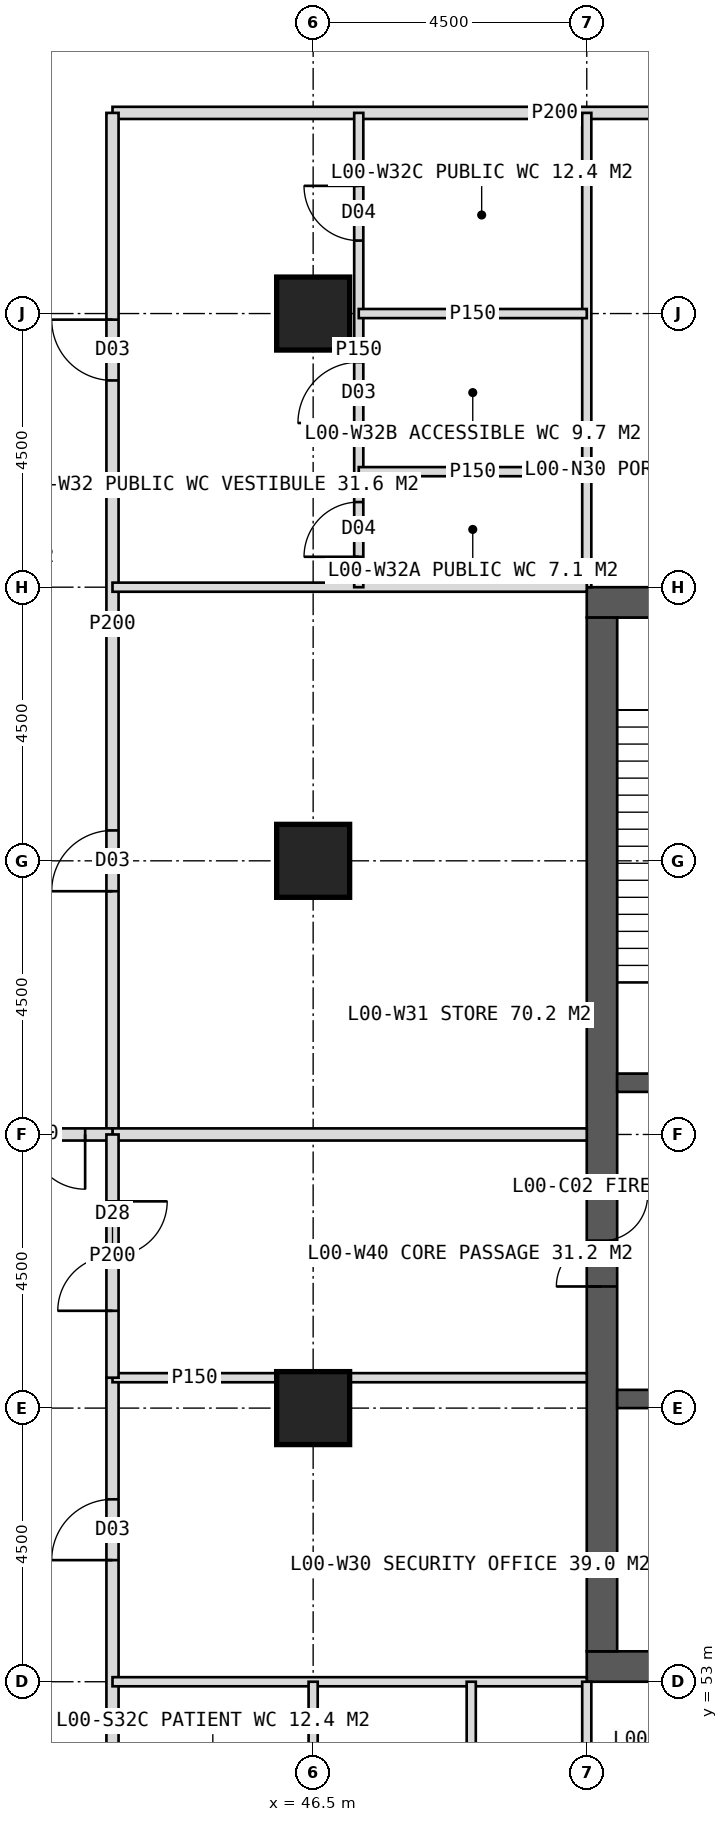
"""IFC4 building model, lengths in metres.
Left out: names, types, materials, properties, quantities, classifications, styles, units other than length and angle.
Written with IfcOpenShell. Run it as: python <this file> out.ifc"""

import sys

from ifc_helpers import new_model, si_unit, direction, frame, frame_2d, origin, origin_2d, place, context, subcontext, project, spatial, rectangle, hollow_rectangle, extrude, element, fill, save


model = new_model("IFC4")
c1 = context("Model", 3, precision=1e-05, world=origin(), true_north=direction((0.0, 1.0)))
c2 = subcontext(c1, "Body", "Model", "MODEL_VIEW")
j1 = project(units=[si_unit("LENGTHUNIT", "METRE"), si_unit("PLANEANGLEUNIT", "RADIAN")], contexts=[c1])
p1 = place(None, origin())
s1 = spatial("IfcSite", under=j1, at=p1, CompositionType="ELEMENT")
p2 = place(p1, origin())
s2 = spatial("IfcBuilding", under=s1, at=p2, CompositionType="ELEMENT")
p3 = place(p2, origin())
s3 = spatial("IfcBuildingStorey", under=s2, at=p3, CompositionType="ELEMENT", Elevation=0.0)
p4 = place(p3, frame((51.0, 70.75, 0.0), z_axis=(0.0, 0.0, 1.0), x_axis=(1.0, 0.0, 0.0)))
e1 = element("IfcWall", 1, at=p4, inside=s3, PredefinedType="SHEAR", context=c2, shape_type="SweptSolid", body=[
    extrude(rectangle(XDim=18.0, YDim=0.5, at=frame_2d((9.0, 0.0))), origin(), (0.0, 0.0, 1.0), 6.0),
])
p5 = place(p4, frame((8.1, 0.0, 0.0)))
e2 = element("IfcOpeningElement", 2, at=p5, cuts=e1, PredefinedType="OPENING", context=c2, shape_type="SweptSolid", body=[
    extrude(rectangle(XDim=1.8, YDim=2.2, at=frame_2d((0.9, 1.1))), frame((0.0, 0.26, 0.0), z_axis=(0.0, -1.0, 0.0), x_axis=(1.0, 0.0, 0.0)), (0.0, 0.0, 1.0), 0.52),
])
p6 = place(p3, frame((51.0, 53.25, 0.0), z_axis=(0.0, 0.0, 1.0), x_axis=(1.0, 0.0, 0.0)))
e3 = element("IfcWall", 3, at=p6, inside=s3, PredefinedType="SHEAR", context=c2, shape_type="SweptSolid", body=[
    extrude(rectangle(XDim=18.0, YDim=0.5, at=frame_2d((9.0, 0.0))), origin(), (0.0, 0.0, 1.0), 6.0),
])
p7 = place(p6, frame((8.1, 0.0, 0.0)))
e4 = element("IfcOpeningElement", 4, at=p7, cuts=e3, PredefinedType="OPENING", context=c2, shape_type="SweptSolid", body=[
    extrude(rectangle(XDim=1.8, YDim=2.2, at=frame_2d((0.9, 1.1))), frame((0.0, 0.26, 0.0), z_axis=(0.0, -1.0, 0.0), x_axis=(1.0, 0.0, 0.0)), (0.0, 0.0, 1.0), 0.52),
])
p8 = place(p3, frame((51.25, 53.5, 0.0), z_axis=(0.0, 0.0, 1.0), x_axis=(0.0, 1.0, 0.0)))
e5 = element("IfcWall", 5, at=p8, inside=s3, PredefinedType="SHEAR", context=c2, shape_type="SweptSolid", body=[
    extrude(rectangle(XDim=17.0, YDim=0.5, at=frame_2d((8.5, 0.0))), origin(), (0.0, 0.0, 1.0), 6.0),
])
p9 = place(p8, frame((6.0, 0.0, 0.0)))
e6 = element("IfcOpeningElement", 6, at=p9, cuts=e5, PredefinedType="OPENING", context=c2, shape_type="SweptSolid", body=[
    extrude(rectangle(XDim=1.5, YDim=2.2, at=frame_2d((0.75, 1.1))), frame((0.0, 0.26, 0.0), z_axis=(0.0, -1.0, 0.0), x_axis=(1.0, 0.0, 0.0)), (0.0, 0.0, 1.0), 0.52),
])
p10 = place(p3, frame((51.5, 62.85, 0.0), z_axis=(0.0, 0.0, 1.0), x_axis=(1.0, 0.0, 0.0)))
e7 = element("IfcWall", 7, at=p10, inside=s3, PredefinedType="SHEAR", context=c2, shape_type="SweptSolid", body=[
    extrude(rectangle(XDim=3.3, YDim=0.3, at=frame_2d((1.65, 0.0))), origin(), (0.0, 0.0, 1.0), 6.0),
])
p11 = place(p10, frame((1.05, 0.0, 0.0)))
e8 = element("IfcOpeningElement", 8, at=p11, cuts=e7, PredefinedType="OPENING", context=c2, shape_type="SweptSolid", body=[
    extrude(rectangle(XDim=1.2, YDim=2.1, at=frame_2d((0.6, 1.05))), frame((0.0, 0.16, 0.0), z_axis=(0.0, -1.0, 0.0), x_axis=(1.0, 0.0, 0.0)), (0.0, 0.0, 1.0), 0.32),
])
p12 = place(p3, frame((51.5, 57.65, 0.0), z_axis=(0.0, 0.0, 1.0), x_axis=(1.0, 0.0, 0.0)))
e9 = element("IfcWall", 9, at=p12, inside=s3, PredefinedType="SHEAR", context=c2, shape_type="SweptSolid", body=[
    extrude(rectangle(XDim=3.3, YDim=0.3, at=frame_2d((1.65, 0.0))), origin(), (0.0, 0.0, 1.0), 6.0),
])
p13 = place(p12, frame((1.05, 0.0, 0.0)))
e10 = element("IfcOpeningElement", 10, at=p13, cuts=e9, PredefinedType="OPENING", context=c2, shape_type="SweptSolid", body=[
    extrude(rectangle(XDim=1.2, YDim=2.2, at=frame_2d((0.6, 1.1))), frame((0.0, 0.16, 0.0), z_axis=(0.0, -1.0, 0.0), x_axis=(1.0, 0.0, 0.0)), (0.0, 0.0, 1.0), 0.32),
])
for number, where, z_axis, x_axis in (
    (11, (46.5, 75.5, 0.0), (0.0, 0.0, 1.0), (1.0, 0.0, 0.0)),
    (12, (46.5, 57.5, 0.0), (0.0, 0.0, 1.0), (1.0, 0.0, 0.0)),
    (13, (46.5, 66.5, 0.0), (0.0, 0.0, 1.0), (1.0, 0.0, 0.0)),
):
    element("IfcColumn", number, at=place(p3, frame(where, z_axis=z_axis, x_axis=x_axis)), inside=s3, PredefinedType="COLUMN", context=c2, shape_type="SweptSolid", body=[
        extrude(hollow_rectangle(XDim=1.2, YDim=1.2, WallThickness=0.1, at=origin_2d()), origin(), (0.0, 0.0, 1.0), 6.0),
    ])
p14 = place(p3, frame((43.2, 78.8, 0.0), z_axis=(0.0, 0.0, 1.0), x_axis=(1.0, 0.0, 0.0)))
e14 = element("IfcWall", 14, at=p14, inside=s3, PredefinedType="PARTITIONING", context=c2, shape_type="SweptSolid", body=[
    extrude(rectangle(XDim=14.55, YDim=0.2, at=frame_2d((7.275, 0.0))), origin(), (0.0, 0.0, 1.0), 5.7),
])
p15 = place(p14, frame((10.675, 0.0, 0.0)))
e15 = element("IfcOpeningElement", 15, at=p15, cuts=e14, PredefinedType="OPENING", context=c2, shape_type="SweptSolid", body=[
    extrude(rectangle(XDim=1.0, YDim=2.1, at=frame_2d((0.5, 1.05))), frame((0.0, 0.11, 0.0), z_axis=(0.0, -1.0, 0.0), x_axis=(1.0, 0.0, 0.0)), (0.0, 0.0, 1.0), 0.22),
])
p16 = place(p3, frame((51.0, 71.0, 0.0), z_axis=(0.0, 0.0, 1.0), x_axis=(0.0, 1.0, 0.0)))
e16 = element("IfcWall", 16, at=p16, inside=s3, PredefinedType="PARTITIONING", context=c2, shape_type="SweptSolid", body=[
    extrude(rectangle(XDim=7.8, YDim=0.15, at=frame_2d((3.9, 0.0))), origin(), (0.0, 0.0, 1.0), 5.7),
])
p17 = place(p3, frame((43.2, 45.2, 0.0), z_axis=(0.0, 0.0, 1.0), x_axis=(0.0, 1.0, 0.0)))
e17 = element("IfcWall", 17, at=p17, inside=s3, PredefinedType="PARTITIONING", context=c2, shape_type="SweptSolid", body=[
    extrude(rectangle(XDim=12.8, YDim=0.2, at=frame_2d((6.4, 0.0))), origin(), (0.0, 0.0, 1.0), 5.7),
])
p18 = place(p17, frame((9.8, 0.0, 0.0)))
e18 = element("IfcOpeningElement", 18, at=p18, cuts=e17, PredefinedType="OPENING", context=c2, shape_type="SweptSolid", body=[
    extrude(rectangle(XDim=1.0, YDim=2.1, at=frame_2d((0.5, 1.05))), frame((0.0, 0.11, 0.0), z_axis=(0.0, -1.0, 0.0), x_axis=(1.0, 0.0, 0.0)), (0.0, 0.0, 1.0), 0.22),
])
p19 = place(p3, frame((43.2, 62.0, 0.0), z_axis=(0.0, 0.0, 1.0), x_axis=(0.0, 1.0, 0.0)))
e19 = element("IfcWall", 19, at=p19, inside=s3, PredefinedType="PARTITIONING", context=c2, shape_type="SweptSolid", body=[
    extrude(rectangle(XDim=16.8, YDim=0.2, at=frame_2d((8.4, 0.0))), origin(), (0.0, 0.0, 1.0), 5.7),
])
p20 = place(p19, frame((4.0, 0.0, 0.0)))
e20 = element("IfcOpeningElement", 20, at=p20, cuts=e19, PredefinedType="OPENING", context=c2, shape_type="SweptSolid", body=[
    extrude(rectangle(XDim=1.0, YDim=2.1, at=frame_2d((0.5, 1.05))), frame((0.0, 0.11, 0.0), z_axis=(0.0, -1.0, 0.0), x_axis=(1.0, 0.0, 0.0)), (0.0, 0.0, 1.0), 0.22),
])
p21 = place(p19, frame((12.4, 0.0, 0.0)))
e21 = element("IfcOpeningElement", 21, at=p21, cuts=e19, PredefinedType="OPENING", context=c2, shape_type="SweptSolid", body=[
    extrude(rectangle(XDim=1.0, YDim=2.1, at=frame_2d((0.5, 1.05))), frame((0.0, 0.11, 0.0), z_axis=(0.0, -1.0, 0.0), x_axis=(1.0, 0.0, 0.0)), (0.0, 0.0, 1.0), 0.22),
])
p22 = place(p3, frame((51.0, 53.0, 0.0), z_axis=(0.0, 0.0, 1.0), x_axis=(-1.0, 0.0, 0.0)))
e22 = element("IfcWall", 22, at=p22, inside=s3, PredefinedType="PARTITIONING", context=c2, shape_type="SweptSolid", body=[
    extrude(rectangle(XDim=7.8, YDim=0.15, at=frame_2d((3.9, 0.0))), origin(), (0.0, 0.0, 1.0), 5.7),
])
p23 = place(p3, frame((51.0, 58.0, 0.0), z_axis=(0.0, 0.0, 1.0), x_axis=(-1.0, 0.0, 0.0)))
e23 = element("IfcWall", 23, at=p23, inside=s3, PredefinedType="PARTITIONING", context=c2, shape_type="SweptSolid", body=[
    extrude(rectangle(XDim=3.9, YDim=0.15, at=frame_2d((1.95, 0.0))), origin(), (0.0, 0.0, 1.0), 5.7),
])
p24 = place(p3, frame((45.9, 58.0, 0.0), z_axis=(0.0, 0.0, 1.0), x_axis=(-1.0, 0.0, 0.0)))
e24 = element("IfcWall", 24, at=p24, inside=s3, PredefinedType="PARTITIONING", context=c2, shape_type="SweptSolid", body=[
    extrude(rectangle(XDim=2.7, YDim=0.15, at=frame_2d((1.35, 0.0))), origin(), (0.0, 0.0, 1.0), 5.7),
])
p25 = place(p3, frame((51.0, 62.0, 0.0), z_axis=(0.0, 0.0, 1.0), x_axis=(-1.0, 0.0, 0.0)))
e25 = element("IfcWall", 25, at=p25, inside=s3, PredefinedType="SOLIDWALL", context=c2, shape_type="SweptSolid", body=[
    extrude(rectangle(XDim=7.8, YDim=0.2, at=frame_2d((3.9, 0.0))), origin(), (0.0, 0.0, 1.0), 4.9),
])
p26 = place(p3, frame((51.0, 71.0, 0.0), z_axis=(0.0, 0.0, 1.0), x_axis=(-1.0, 0.0, 0.0)))
e26 = element("IfcWall", 26, at=p26, inside=s3, PredefinedType="PARTITIONING", context=c2, shape_type="SweptSolid", body=[
    extrude(rectangle(XDim=7.8, YDim=0.15, at=frame_2d((3.9, 0.0))), origin(), (0.0, 0.0, 1.0), 5.7),
])
p27 = place(p3, frame((47.25, 71.0, 0.0), z_axis=(0.0, 0.0, 1.0), x_axis=(0.0, 1.0, 0.0)))
e27 = element("IfcWall", 27, at=p27, inside=s3, PredefinedType="PARTITIONING", context=c2, shape_type="SweptSolid", body=[
    extrude(rectangle(XDim=7.8, YDim=0.15, at=frame_2d((3.9, 0.0))), origin(), (0.0, 0.0, 1.0), 5.7),
])
p28 = place(p27, frame((0.5, 0.0, 0.0)))
e28 = element("IfcOpeningElement", 28, at=p28, cuts=e27, PredefinedType="OPENING", context=c2, shape_type="SweptSolid", body=[
    extrude(rectangle(XDim=0.9, YDim=2.1, at=frame_2d((0.45, 1.05))), frame((0.0, 0.085, 0.0), z_axis=(0.0, -1.0, 0.0), x_axis=(1.0, 0.0, 0.0)), (0.0, 0.0, 1.0), 0.17),
])
p29 = place(p27, frame((2.7, 0.0, 0.0)))
e29 = element("IfcOpeningElement", 29, at=p29, cuts=e27, PredefinedType="OPENING", context=c2, shape_type="SweptSolid", body=[
    extrude(rectangle(XDim=1.0, YDim=2.1, at=frame_2d((0.5, 1.05))), frame((0.0, 0.085, 0.0), z_axis=(0.0, -1.0, 0.0), x_axis=(1.0, 0.0, 0.0)), (0.0, 0.0, 1.0), 0.17),
])
p30 = place(p27, frame((5.7, 0.0, 0.0)))
e30 = element("IfcOpeningElement", 30, at=p30, cuts=e27, PredefinedType="OPENING", context=c2, shape_type="SweptSolid", body=[
    extrude(rectangle(XDim=0.9, YDim=2.1, at=frame_2d((0.45, 1.05))), frame((0.0, 0.085, 0.0), z_axis=(0.0, -1.0, 0.0), x_axis=(1.0, 0.0, 0.0)), (0.0, 0.0, 1.0), 0.17),
])
p31 = place(p3, frame((51.0, 72.9, 0.0), z_axis=(0.0, 0.0, 1.0), x_axis=(-1.0, 0.0, 0.0)))
e31 = element("IfcWall", 31, at=p31, inside=s3, PredefinedType="PARTITIONING", context=c2, shape_type="SweptSolid", body=[
    extrude(rectangle(XDim=3.75, YDim=0.15, at=frame_2d((1.875, 0.0))), origin(), (0.0, 0.0, 1.0), 5.7),
])
p32 = place(p3, frame((51.0, 75.5, 0.0), z_axis=(0.0, 0.0, 1.0), x_axis=(-1.0, 0.0, 0.0)))
e32 = element("IfcWall", 32, at=p32, inside=s3, PredefinedType="PARTITIONING", context=c2, shape_type="SweptSolid", body=[
    extrude(rectangle(XDim=3.75, YDim=0.15, at=frame_2d((1.875, 0.0))), origin(), (0.0, 0.0, 1.0), 4.9),
])
p33 = place(p3, frame((51.0, 53.0, 0.0), z_axis=(0.0, 0.0, 1.0), x_axis=(0.0, -1.0, 0.0)))
e33 = element("IfcWall", 33, at=p33, inside=s3, PredefinedType="PARTITIONING", context=c2, shape_type="SweptSolid", body=[
    extrude(rectangle(XDim=7.8, YDim=0.15, at=frame_2d((3.9, 0.0))), origin(), (0.0, 0.0, 1.0), 5.7),
])
p34 = place(p3, frame((49.1, 53.0, 0.0), z_axis=(0.0, 0.0, 1.0), x_axis=(0.0, -1.0, 0.0)))
e34 = element("IfcWall", 34, at=p34, inside=s3, PredefinedType="PARTITIONING", context=c2, shape_type="SweptSolid", body=[
    extrude(rectangle(XDim=3.75, YDim=0.15, at=frame_2d((1.875, 0.0))), origin(), (0.0, 0.0, 1.0), 5.7),
])
p35 = place(p3, frame((46.5, 53.0, 0.0), z_axis=(0.0, 0.0, 1.0), x_axis=(0.0, -1.0, 0.0)))
e35 = element("IfcWall", 35, at=p35, inside=s3, PredefinedType="PARTITIONING", context=c2, shape_type="SweptSolid", body=[
    extrude(rectangle(XDim=3.75, YDim=0.15, at=frame_2d((1.875, 0.0))), origin(), (0.0, 0.0, 1.0), 4.9),
])
p36 = place(p3, frame((43.2, 62.0, 0.0), z_axis=(0.0, 0.0, 1.0), x_axis=(-1.0, 0.0, 0.0)))
e36 = element("IfcWall", 36, at=p36, inside=s3, PredefinedType="SOLIDWALL", context=c2, shape_type="SweptSolid", body=[
    extrude(rectangle(XDim=2.7, YDim=0.2, at=frame_2d((1.35, 0.0))), origin(), (0.0, 0.0, 1.0), 4.9),
])
p37 = place(p36, frame((0.45, 0.0, 0.0)))
e37 = element("IfcOpeningElement", 37, at=p37, cuts=e36, PredefinedType="OPENING", context=c2, shape_type="SweptSolid", body=[
    extrude(rectangle(XDim=1.8, YDim=2.2, at=frame_2d((0.9, 1.1))), frame((0.0, 0.11, 0.0), z_axis=(0.0, -1.0, 0.0), x_axis=(1.0, 0.0, 0.0)), (0.0, 0.0, 1.0), 0.22),
])
p38 = place(p3, frame((43.2, 58.0, 0.0), z_axis=(0.0, 0.0, 1.0), x_axis=(0.0, 1.0, 0.0)))
e38 = element("IfcWall", 38, at=p38, inside=s3, PredefinedType="PARTITIONING", context=c2, shape_type="SweptSolid", body=[
    extrude(rectangle(XDim=4.0, YDim=0.2, at=frame_2d((2.0, 0.0))), origin(), (0.0, 0.0, 1.0), 5.7),
])
p39 = place(p38, frame((1.1, 0.0, 0.0)))
e39 = element("IfcOpeningElement", 39, at=p39, cuts=e38, PredefinedType="OPENING", context=c2, shape_type="SweptSolid", body=[
    extrude(rectangle(XDim=1.8, YDim=2.2, at=frame_2d((0.9, 1.1))), frame((0.0, 0.11, 0.0), z_axis=(0.0, -1.0, 0.0), x_axis=(1.0, 0.0, 0.0)), (0.0, 0.0, 1.0), 0.22),
])
p40 = place(p18, origin())
e40 = element("IfcDoor", 40, at=p40, inside=s3, OperationType="SINGLE_SWING_LEFT", PredefinedType="DOOR", context=c2, shape_type="SweptSolid", body=[
    extrude(rectangle(XDim=1.0, YDim=2.1, at=frame_2d((0.5, 1.05))), frame((0.0, 0.025, 0.0), z_axis=(0.0, -1.0, 0.0), x_axis=(1.0, 0.0, 0.0)), (0.0, 0.0, 1.0), 0.05),
])
fill(e18, e40)
p41 = place(p20, origin())
e41 = element("IfcDoor", 41, at=p41, inside=s3, OperationType="SINGLE_SWING_LEFT", PredefinedType="DOOR", context=c2, shape_type="SweptSolid", body=[
    extrude(rectangle(XDim=1.0, YDim=2.1, at=frame_2d((0.5, 1.05))), frame((0.0, 0.025, 0.0), z_axis=(0.0, -1.0, 0.0), x_axis=(1.0, 0.0, 0.0)), (0.0, 0.0, 1.0), 0.05),
])
fill(e20, e41)
p42 = place(p21, origin())
e42 = element("IfcDoor", 42, at=p42, inside=s3, OperationType="SINGLE_SWING_RIGHT", PredefinedType="DOOR", context=c2, shape_type="SweptSolid", body=[
    extrude(rectangle(XDim=1.0, YDim=2.1, at=frame_2d((0.5, 1.05))), frame((0.0, 0.025, 0.0), z_axis=(0.0, -1.0, 0.0), x_axis=(1.0, 0.0, 0.0)), (0.0, 0.0, 1.0), 0.05),
])
fill(e21, e42)
p43 = place(p37, origin())
e43 = element("IfcDoor", 43, at=p43, inside=s3, OperationType="DOUBLE_DOOR_DOUBLE_SWING", PredefinedType="DOOR", context=c2, shape_type="SweptSolid", body=[
    extrude(rectangle(XDim=1.8, YDim=2.2, at=frame_2d((0.9, 1.1))), frame((0.0, 0.025, 0.0), z_axis=(0.0, -1.0, 0.0), x_axis=(1.0, 0.0, 0.0)), (0.0, 0.0, 1.0), 0.05),
])
fill(e37, e43)
p44 = place(p9, origin())
e44 = element("IfcDoor", 44, at=p44, inside=s3, OperationType="DOUBLE_DOOR_SINGLE_SWING", PredefinedType="DOOR", context=c2, shape_type="SweptSolid", body=[
    extrude(rectangle(XDim=1.5, YDim=2.2, at=frame_2d((0.75, 1.1))), frame((0.0, 0.025, 0.0), z_axis=(0.0, -1.0, 0.0), x_axis=(1.0, 0.0, 0.0)), (0.0, 0.0, 1.0), 0.05),
])
fill(e6, e44)
p45 = place(p28, origin())
e45 = element("IfcDoor", 45, at=p45, inside=s3, OperationType="SINGLE_SWING_LEFT", PredefinedType="DOOR", context=c2, shape_type="SweptSolid", body=[
    extrude(rectangle(XDim=0.9, YDim=2.1, at=frame_2d((0.45, 1.05))), frame((0.0, 0.025, 0.0), z_axis=(0.0, -1.0, 0.0), x_axis=(1.0, 0.0, 0.0)), (0.0, 0.0, 1.0), 0.05),
])
fill(e28, e45)
p46 = place(p29, origin())
e46 = element("IfcDoor", 46, at=p46, inside=s3, OperationType="SINGLE_SWING_LEFT", PredefinedType="DOOR", context=c2, shape_type="SweptSolid", body=[
    extrude(rectangle(XDim=1.0, YDim=2.1, at=frame_2d((0.5, 1.05))), frame((0.0, 0.025, 0.0), z_axis=(0.0, -1.0, 0.0), x_axis=(1.0, 0.0, 0.0)), (0.0, 0.0, 1.0), 0.05),
])
fill(e29, e46)
p47 = place(p30, origin())
e47 = element("IfcDoor", 47, at=p47, inside=s3, OperationType="SINGLE_SWING_RIGHT", PredefinedType="DOOR", context=c2, shape_type="SweptSolid", body=[
    extrude(rectangle(XDim=0.9, YDim=2.1, at=frame_2d((0.45, 1.05))), frame((0.0, 0.025, 0.0), z_axis=(0.0, -1.0, 0.0), x_axis=(1.0, 0.0, 0.0)), (0.0, 0.0, 1.0), 0.05),
])
fill(e30, e47)
p48 = place(p39, origin())
e48 = element("IfcDoor", 48, at=p48, inside=s3, OperationType="DOUBLE_DOOR_SINGLE_SWING", PredefinedType="DOOR", context=c2, shape_type="SweptSolid", body=[
    extrude(rectangle(XDim=1.8, YDim=2.2, at=frame_2d((0.9, 1.1))), frame((0.0, 0.025, 0.0), z_axis=(0.0, -1.0, 0.0), x_axis=(1.0, 0.0, 0.0)), (0.0, 0.0, 1.0), 0.05),
])
fill(e39, e48)
save(model, sys.argv[1])
